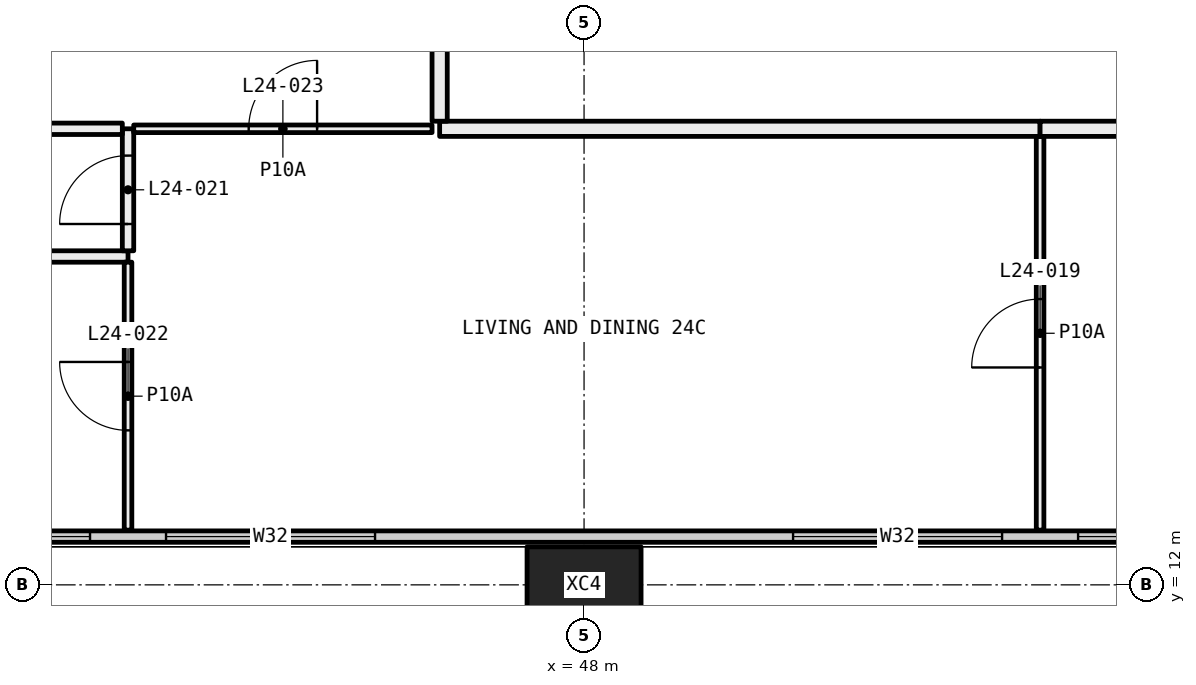
"""IFC4 building model, lengths in metres.
Left out: names, types, materials, properties, quantities, classifications, styles, units other than length and angle.
Written with IfcOpenShell. Run it as: python <this file> out.ifc"""

import sys

from ifc_helpers import new_model, si_unit, direction, frame, frame_2d, origin, origin_2d, place, context, subcontext, project, spatial, rectangle, hollow_rectangle, extrude, element, fill, save


model = new_model("IFC4")
c1 = context("Model", 3, precision=1e-05, world=origin(), true_north=direction((0.0, 1.0)))
c2 = subcontext(c1, "Body", "Model", "MODEL_VIEW")
j1 = project(units=[si_unit("LENGTHUNIT", "METRE"), si_unit("PLANEANGLEUNIT", "RADIAN")], contexts=[c1])
p1 = place(None, origin())
s1 = spatial("IfcSite", under=j1, at=p1, CompositionType="ELEMENT")
p2 = place(p1, origin())
s2 = spatial("IfcBuilding", under=s1, at=p2, CompositionType="ELEMENT")
p3 = place(p2, frame((0.0, 0.0, 96.6)))
s3 = spatial("IfcBuildingStorey", under=s2, at=p3, CompositionType="ELEMENT", Elevation=96.6)
p4 = place(p3, frame((48.0, 12.0, -0.4), z_axis=(0.0, 0.0, 1.0), x_axis=(1.0, 0.0, 0.0)))
e1 = element("IfcColumn", 1, at=p4, inside=s3, PredefinedType="COLUMN", context=c2, shape_type="SweptSolid", body=[
    extrude(hollow_rectangle(XDim=1.5, YDim=1.0, WallThickness=0.06, at=origin_2d()), origin(), (0.0, 0.0, 1.0), 3.45),
])
p5 = place(p3, frame((6.56, 12.635, 0.0), z_axis=(0.0, 0.0, 1.0), x_axis=(1.0, 0.0, 0.0)))
e2 = element("IfcWall", 2, at=p5, inside=s3, PredefinedType="ELEMENTEDWALL", context=c2, shape_type="SweptSolid", body=[
    extrude(rectangle(XDim=58.88, YDim=0.15, at=frame_2d((29.44, 0.0))), origin(), (0.0, 0.0, 1.0), 3.05),
])
p6 = place(p5, frame((0.44, 0.0, 0.45)))
e3 = element("IfcOpeningElement", 3, at=p6, cuts=e2, PredefinedType="OPENING", context=c2, shape_type="SweptSolid", body=[
    extrude(rectangle(XDim=4.5, YDim=2.55, at=frame_2d((2.25, 1.275))), frame((0.0, 0.085, 0.0), z_axis=(0.0, -1.0, 0.0), x_axis=(1.0, 0.0, 0.0)), (0.0, 0.0, 1.0), 0.17),
])
p7 = place(p5, frame((8.19, 0.0, 0.45)))
e4 = element("IfcOpeningElement", 4, at=p7, cuts=e2, PredefinedType="OPENING", context=c2, shape_type="SweptSolid", body=[
    extrude(rectangle(XDim=2.75, YDim=2.55, at=frame_2d((1.375, 1.275))), frame((0.0, 0.085, 0.0), z_axis=(0.0, -1.0, 0.0), x_axis=(1.0, 0.0, 0.0)), (0.0, 0.0, 1.0), 0.17),
])
p8 = place(p5, frame((11.94, 0.0, 0.45)))
e5 = element("IfcOpeningElement", 5, at=p8, cuts=e2, PredefinedType="OPENING", context=c2, shape_type="SweptSolid", body=[
    extrude(rectangle(XDim=2.75, YDim=2.55, at=frame_2d((1.375, 1.275))), frame((0.0, 0.085, 0.0), z_axis=(0.0, -1.0, 0.0), x_axis=(1.0, 0.0, 0.0)), (0.0, 0.0, 1.0), 0.17),
])
p9 = place(p5, frame((20.19, 0.0, 0.45)))
e6 = element("IfcOpeningElement", 6, at=p9, cuts=e2, PredefinedType="OPENING", context=c2, shape_type="SweptSolid", body=[
    extrude(rectangle(XDim=2.75, YDim=2.55, at=frame_2d((1.375, 1.275))), frame((0.0, 0.085, 0.0), z_axis=(0.0, -1.0, 0.0), x_axis=(1.0, 0.0, 0.0)), (0.0, 0.0, 1.0), 0.17),
])
p10 = place(p5, frame((23.94, 0.0, 0.45)))
e7 = element("IfcOpeningElement", 7, at=p10, cuts=e2, PredefinedType="OPENING", context=c2, shape_type="SweptSolid", body=[
    extrude(rectangle(XDim=2.0, YDim=2.55, at=frame_2d((1.0, 1.275))), frame((0.0, 0.085, 0.0), z_axis=(0.0, -1.0, 0.0), x_axis=(1.0, 0.0, 0.0)), (0.0, 0.0, 1.0), 0.17),
])
p11 = place(p5, frame((32.19, 0.0, 0.45)))
e8 = element("IfcOpeningElement", 8, at=p11, cuts=e2, PredefinedType="OPENING", context=c2, shape_type="SweptSolid", body=[
    extrude(rectangle(XDim=2.75, YDim=2.55, at=frame_2d((1.375, 1.275))), frame((0.0, 0.085, 0.0), z_axis=(0.0, -1.0, 0.0), x_axis=(1.0, 0.0, 0.0)), (0.0, 0.0, 1.0), 0.17),
])
p12 = place(p5, frame((35.94, 0.0, 0.45)))
e9 = element("IfcOpeningElement", 9, at=p12, cuts=e2, PredefinedType="OPENING", context=c2, shape_type="SweptSolid", body=[
    extrude(rectangle(XDim=2.75, YDim=2.55, at=frame_2d((1.375, 1.275))), frame((0.0, 0.085, 0.0), z_axis=(0.0, -1.0, 0.0), x_axis=(1.0, 0.0, 0.0)), (0.0, 0.0, 1.0), 0.17),
])
p13 = place(p5, frame((44.19, 0.0, 0.45)))
e10 = element("IfcOpeningElement", 10, at=p13, cuts=e2, PredefinedType="OPENING", context=c2, shape_type="SweptSolid", body=[
    extrude(rectangle(XDim=2.75, YDim=2.55, at=frame_2d((1.375, 1.275))), frame((0.0, 0.085, 0.0), z_axis=(0.0, -1.0, 0.0), x_axis=(1.0, 0.0, 0.0)), (0.0, 0.0, 1.0), 0.17),
])
p14 = place(p5, frame((47.94, 0.0, 0.45)))
e11 = element("IfcOpeningElement", 11, at=p14, cuts=e2, PredefinedType="OPENING", context=c2, shape_type="SweptSolid", body=[
    extrude(rectangle(XDim=2.0, YDim=2.55, at=frame_2d((1.0, 1.275))), frame((0.0, 0.085, 0.0), z_axis=(0.0, -1.0, 0.0), x_axis=(1.0, 0.0, 0.0)), (0.0, 0.0, 1.0), 0.17),
])
p15 = place(p5, frame((53.94, 0.0, 0.45)))
e12 = element("IfcOpeningElement", 12, at=p15, cuts=e2, PredefinedType="OPENING", context=c2, shape_type="SweptSolid", body=[
    extrude(rectangle(XDim=4.5, YDim=2.55, at=frame_2d((2.25, 1.275))), frame((0.0, 0.085, 0.0), z_axis=(0.0, -1.0, 0.0), x_axis=(1.0, 0.0, 0.0)), (0.0, 0.0, 1.0), 0.17),
])
p16 = place(p3, frame((42.0, 16.32, 0.0), z_axis=(0.0, 0.0, 1.0), x_axis=(-1.0, 0.0, 0.0)))
e13 = element("IfcWall", 13, at=p16, inside=s3, PredefinedType="PARTITIONING", context=c2, shape_type="SweptSolid", body=[
    extrude(rectangle(XDim=5.9, YDim=0.15, at=frame_2d((2.95, 0.0))), origin(), (0.0, 0.0, 1.0), 3.05),
])
p17 = place(p3, frame((42.0, 12.72, 0.0), z_axis=(0.0, 0.0, 1.0), x_axis=(0.0, 1.0, 0.0)))
e14 = element("IfcWall", 14, at=p17, inside=s3, PredefinedType="PARTITIONING", context=c2, shape_type="SweptSolid", body=[
    extrude(rectangle(XDim=3.525, YDim=0.1, at=frame_2d((1.763, 0.0))), origin(), (0.0, 0.0, 1.0), 3.05),
])
p18 = place(p17, frame((1.312, 0.0, 0.0)))
e15 = element("IfcOpeningElement", 15, at=p18, cuts=e14, PredefinedType="OPENING", context=c2, shape_type="SweptSolid", body=[
    extrude(rectangle(XDim=0.9, YDim=2.1, at=frame_2d((0.45, 1.05))), frame((0.0, 0.06, 0.0), z_axis=(0.0, -1.0, 0.0), x_axis=(1.0, 0.0, 0.0)), (0.0, 0.0, 1.0), 0.12),
])
p19 = place(p3, frame((42.0, 16.395, 0.0), z_axis=(0.0, 0.0, 1.0), x_axis=(0.0, 1.0, 0.0)))
e16 = element("IfcWall", 16, at=p19, inside=s3, PredefinedType="PARTITIONING", context=c2, shape_type="SweptSolid", body=[
    extrude(rectangle(XDim=1.605, YDim=0.15, at=frame_2d((0.802, 0.0))), origin(), (0.0, 0.0, 1.0), 3.05),
])
p20 = place(p19, frame((0.353, 0.0, 0.0)))
e17 = element("IfcOpeningElement", 17, at=p20, cuts=e16, PredefinedType="OPENING", context=c2, shape_type="SweptSolid", body=[
    extrude(rectangle(XDim=0.9, YDim=2.1, at=frame_2d((0.45, 1.05))), frame((0.0, 0.085, 0.0), z_axis=(0.0, -1.0, 0.0), x_axis=(1.0, 0.0, 0.0)), (0.0, 0.0, 1.0), 0.17),
])
p21 = place(p3, frame((41.925, 18.0, 0.0), z_axis=(0.0, 0.0, 1.0), x_axis=(-1.0, 0.0, 0.0)))
e18 = element("IfcWall", 18, at=p21, inside=s3, PredefinedType="PARTITIONING", context=c2, shape_type="SweptSolid", body=[
    extrude(rectangle(XDim=1.425, YDim=0.15, at=frame_2d((0.712, 0.0))), origin(), (0.0, 0.0, 1.0), 3.05),
])
p22 = place(p3, frame((54.0, 12.72, 0.0), z_axis=(0.0, 0.0, 1.0), x_axis=(0.0, 1.0, 0.0)))
e19 = element("IfcWall", 19, at=p22, inside=s3, PredefinedType="PARTITIONING", context=c2, shape_type="SweptSolid", body=[
    extrude(rectangle(XDim=5.18, YDim=0.1, at=frame_2d((2.59, 0.0))), origin(), (0.0, 0.0, 1.0), 3.05),
])
p23 = place(p22, frame((2.14, 0.0, 0.0)))
e20 = element("IfcOpeningElement", 20, at=p23, cuts=e19, PredefinedType="OPENING", context=c2, shape_type="SweptSolid", body=[
    extrude(rectangle(XDim=0.9, YDim=2.1, at=frame_2d((0.45, 1.05))), frame((0.0, 0.06, 0.0), z_axis=(0.0, -1.0, 0.0), x_axis=(1.0, 0.0, 0.0)), (0.0, 0.0, 1.0), 0.12),
])
p24 = place(p3, frame((46.0, 18.0, 0.0), z_axis=(0.0, 0.0, 1.0), x_axis=(-1.0, 0.0, 0.0)))
e21 = element("IfcWall", 21, at=p24, inside=s3, PredefinedType="PARTITIONING", context=c2, shape_type="SweptSolid", body=[
    extrude(rectangle(XDim=3.925, YDim=0.1, at=frame_2d((1.962, 0.0))), origin(), (0.0, 0.0, 1.0), 3.05),
])
p25 = place(p24, frame((1.512, 0.0, 0.0)))
e22 = element("IfcOpeningElement", 22, at=p25, cuts=e21, PredefinedType="OPENING", context=c2, shape_type="SweptSolid", body=[
    extrude(rectangle(XDim=0.9, YDim=2.1, at=frame_2d((0.45, 1.05))), frame((0.0, 0.06, 0.0), z_axis=(0.0, -1.0, 0.0), x_axis=(1.0, 0.0, 0.0)), (0.0, 0.0, 1.0), 0.12),
])
p26 = place(p3, frame((54.0, 18.0, 0.0), z_axis=(0.0, 0.0, 1.0), x_axis=(-1.0, 0.0, 0.0)))
e23 = element("IfcWall", 23, at=p26, inside=s3, PredefinedType="PARTITIONING", context=c2, shape_type="SweptSolid", body=[
    extrude(rectangle(XDim=7.9, YDim=0.2, at=frame_2d((3.95, 0.0))), origin(), (0.0, 0.0, 1.0), 3.05),
])
p27 = place(p3, frame((60.0, 18.0, 0.0), z_axis=(0.0, 0.0, 1.0), x_axis=(-1.0, 0.0, 0.0)))
e24 = element("IfcWall", 24, at=p27, inside=s3, PredefinedType="PARTITIONING", context=c2, shape_type="SweptSolid", body=[
    extrude(rectangle(XDim=6.0, YDim=0.2, at=frame_2d((3.0, 0.0))), origin(), (0.0, 0.0, 1.0), 3.05),
])
p28 = place(p27, frame((2.5, 0.0, 0.0)))
e25 = element("IfcOpeningElement", 25, at=p28, cuts=e24, PredefinedType="OPENING", context=c2, shape_type="SweptSolid", body=[
    extrude(rectangle(XDim=1.0, YDim=2.1, at=frame_2d((0.5, 1.05))), frame((0.0, 0.11, 0.0), z_axis=(0.0, -1.0, 0.0), x_axis=(1.0, 0.0, 0.0)), (0.0, 0.0, 1.0), 0.22),
])
p29 = place(p3, frame((46.1, 18.1, 0.0), z_axis=(0.0, 0.0, 1.0), x_axis=(0.0, 1.0, 0.0)))
e26 = element("IfcWall", 26, at=p29, inside=s3, PredefinedType="PARTITIONING", context=c2, shape_type="SweptSolid", body=[
    extrude(rectangle(XDim=6.2, YDim=0.2, at=frame_2d((3.1, 0.0))), origin(), (0.0, 0.0, 1.0), 2.45),
])
p30 = place(p11, origin())
e27 = element("IfcWindow", 27, at=p30, inside=s3, PartitioningType="SINGLE_PANEL", PredefinedType="WINDOW", context=c2, shape_type="SweptSolid", body=[
    extrude(rectangle(XDim=2.75, YDim=2.55, at=frame_2d((1.375, 1.275))), frame((0.0, 0.03, 0.0), z_axis=(0.0, -1.0, 0.0), x_axis=(1.0, 0.0, 0.0)), (0.0, 0.0, 1.0), 0.06),
])
fill(e8, e27)
p31 = place(p12, origin())
e28 = element("IfcWindow", 28, at=p31, inside=s3, PartitioningType="SINGLE_PANEL", PredefinedType="WINDOW", context=c2, shape_type="SweptSolid", body=[
    extrude(rectangle(XDim=2.75, YDim=2.55, at=frame_2d((1.375, 1.275))), frame((0.0, 0.03, 0.0), z_axis=(0.0, -1.0, 0.0), x_axis=(1.0, 0.0, 0.0)), (0.0, 0.0, 1.0), 0.06),
])
fill(e9, e28)
p32 = place(p13, origin())
e29 = element("IfcWindow", 29, at=p32, inside=s3, PartitioningType="SINGLE_PANEL", PredefinedType="WINDOW", context=c2, shape_type="SweptSolid", body=[
    extrude(rectangle(XDim=2.75, YDim=2.55, at=frame_2d((1.375, 1.275))), frame((0.0, 0.03, 0.0), z_axis=(0.0, -1.0, 0.0), x_axis=(1.0, 0.0, 0.0)), (0.0, 0.0, 1.0), 0.06),
])
fill(e10, e29)
p33 = place(p14, origin())
e30 = element("IfcWindow", 30, at=p33, inside=s3, PartitioningType="SINGLE_PANEL", PredefinedType="WINDOW", context=c2, shape_type="SweptSolid", body=[
    extrude(rectangle(XDim=2.0, YDim=2.55, at=frame_2d((1.0, 1.275))), frame((0.0, 0.03, 0.0), z_axis=(0.0, -1.0, 0.0), x_axis=(1.0, 0.0, 0.0)), (0.0, 0.0, 1.0), 0.06),
])
fill(e11, e30)
p34 = place(p23, origin())
e31 = element("IfcDoor", 31, at=p34, inside=s3, OperationType="SINGLE_SWING_RIGHT", PredefinedType="DOOR", context=c2, shape_type="SweptSolid", body=[
    extrude(rectangle(XDim=0.9, YDim=2.1, at=frame_2d((0.45, 1.05))), frame((0.0, 0.025, 0.0), z_axis=(0.0, -1.0, 0.0), x_axis=(1.0, 0.0, 0.0)), (0.0, 0.0, 1.0), 0.05),
])
fill(e20, e31)
p35 = place(p20, origin())
e32 = element("IfcDoor", 32, at=p35, inside=s3, OperationType="SINGLE_SWING_RIGHT", PredefinedType="DOOR", context=c2, shape_type="SweptSolid", body=[
    extrude(rectangle(XDim=0.9, YDim=2.1, at=frame_2d((0.45, 1.05))), frame((0.0, 0.025, 0.0), z_axis=(0.0, -1.0, 0.0), x_axis=(1.0, 0.0, 0.0)), (0.0, 0.0, 1.0), 0.05),
])
fill(e17, e32)
p36 = place(p18, origin())
e33 = element("IfcDoor", 33, at=p36, inside=s3, OperationType="SINGLE_SWING_LEFT", PredefinedType="DOOR", context=c2, shape_type="SweptSolid", body=[
    extrude(rectangle(XDim=0.9, YDim=2.1, at=frame_2d((0.45, 1.05))), frame((0.0, 0.025, 0.0), z_axis=(0.0, -1.0, 0.0), x_axis=(1.0, 0.0, 0.0)), (0.0, 0.0, 1.0), 0.05),
])
fill(e15, e33)
p37 = place(p25, frame((0.9, 0.0, 0.0), x_axis=(-1.0, 0.0, 0.0)))
e34 = element("IfcDoor", 34, at=p37, inside=s3, OperationType="SINGLE_SWING_LEFT", PredefinedType="DOOR", context=c2, shape_type="SweptSolid", body=[
    extrude(rectangle(XDim=0.9, YDim=2.1, at=frame_2d((0.45, 1.05))), frame((0.0, 0.025, 0.0), z_axis=(0.0, -1.0, 0.0), x_axis=(1.0, 0.0, 0.0)), (0.0, 0.0, 1.0), 0.05),
])
fill(e22, e34)
save(model, sys.argv[1])
